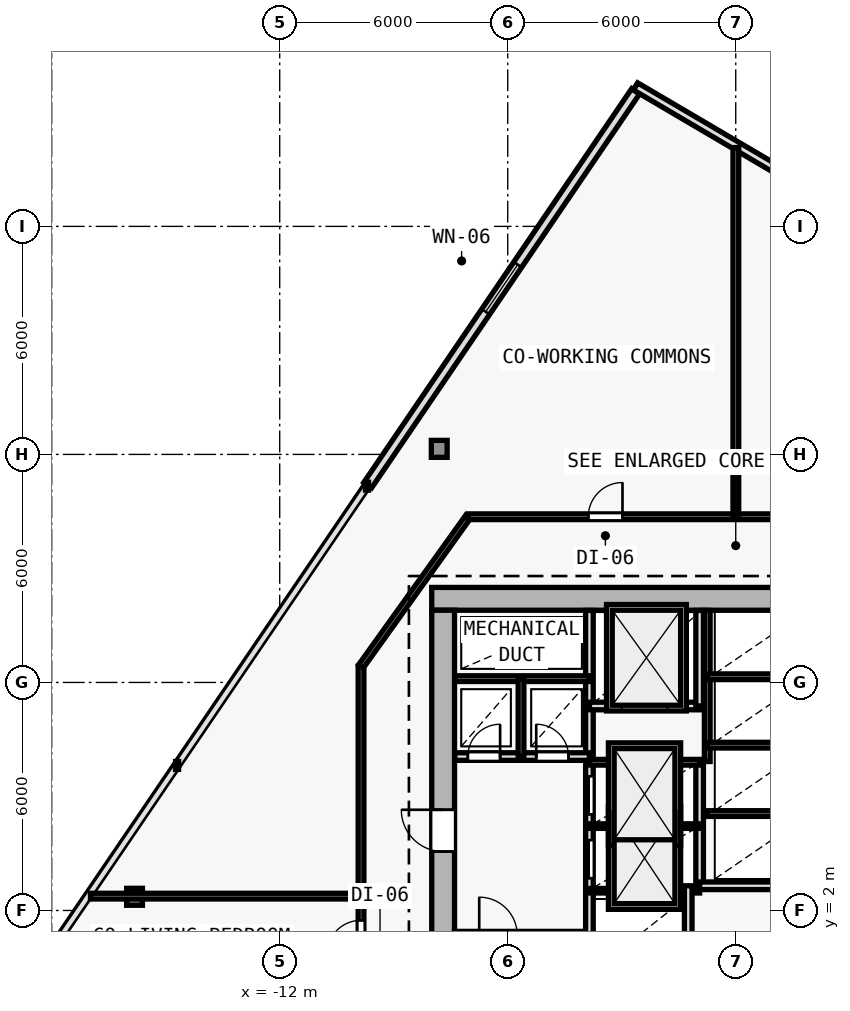
"""IFC4 building model, lengths in metres.
Left out: names, types, materials, properties, quantities, classifications, styles, units other than length and angle.
Written with IfcOpenShell. Run it as: python <this file> out.ifc"""

import sys

from ifc_helpers import new_model, si_unit, direction, frame, frame_2d, origin, origin_2d, place, context, subcontext, project, spatial, rectangle, i_section, extrude, element, fill, save


model = new_model("IFC4")
c1 = context("Model", 3, precision=1e-05, world=origin(), true_north=direction((0.0, 1.0)))
c2 = subcontext(c1, "Body", "Model", "MODEL_VIEW")
j1 = project(units=[si_unit("LENGTHUNIT", "METRE"), si_unit("PLANEANGLEUNIT", "RADIAN")], contexts=[c1])
p1 = place(None, origin())
s1 = spatial("IfcSite", under=j1, at=p1, CompositionType="ELEMENT")
p2 = place(p1, origin())
s2 = spatial("IfcBuilding", under=s1, at=p2, CompositionType="ELEMENT")
p3 = place(p2, frame((0.0, 0.0, 48.0)))
s3 = spatial("IfcBuildingStorey", under=s2, at=p3, CompositionType="ELEMENT", Elevation=48.0)
for number, where, z_axis, x_axis in (
    (1, (-7.7, 10.2, 0.0), (0.0, 0.0, 1.0), (1.0, 0.0, 0.0)),
    (2, (-7.7, 2.0, 0.0), (0.0, 0.0, 1.0), (1.0, 0.0, 0.0)),
):
    element("IfcColumn", number, at=place(p3, frame(where, z_axis=z_axis, x_axis=x_axis)), inside=s3, PredefinedType="COLUMN", context=c2, shape_type="SweptSolid", body=[
        extrude(i_section(OverallWidth=0.416, OverallDepth=0.446, WebThickness=0.025, FlangeThickness=0.04, FilletRadius=0.015, at=origin_2d()), origin(), (0.0, 0.0, 1.0), 3.6),
    ])
p4 = place(p3, frame((-7.802, 14.146, 0.006), z_axis=(0.00877514453, -0.002516901919, 0.999958330153), x_axis=(0.275705143097, 0.961242255662, 0.0)))
e3 = element("IfcColumn", 3, at=p4, inside=s3, PredefinedType="COLUMN", context=c2, shape_type="SweptSolid", body=[
    extrude(i_section(OverallWidth=0.416, OverallDepth=0.446, WebThickness=0.025, FlangeThickness=0.04, FilletRadius=0.015, at=origin_2d()), origin(), (0.0, 0.0, 1.0), 3.589),
])
p5 = place(p3, frame((-15.82, 2.36, 0.006), z_axis=(0.017071567417, 0.009521989794, 0.999808928394), x_axis=(-0.487119351792, 0.873335409284, 0.0)))
e4 = element("IfcColumn", 4, at=p5, inside=s3, PredefinedType="COLUMN", context=c2, shape_type="SweptSolid", body=[
    extrude(i_section(OverallWidth=0.416, OverallDepth=0.446, WebThickness=0.025, FlangeThickness=0.04, FilletRadius=0.015, at=origin_2d()), origin(), (0.0, 0.0, 1.0), 3.59),
])
p6 = place(p3, frame((-9.684, 13.191, 0.0), z_axis=(0.0, 0.0, 1.0), x_axis=(0.562473549685, 0.826815279192, 0.0)))
e5 = element("IfcWall", 5, at=p6, inside=s3, PredefinedType="SOLIDWALL", context=c2, shape_type="SweptSolid", body=[
    extrude(rectangle(XDim=12.536, YDim=0.25, at=frame_2d((6.268, 0.0))), origin(), (0.0, 0.0, 1.0), 3.35),
])
p7 = place(p6, frame((5.518, 0.0, 0.62)))
e6 = element("IfcOpeningElement", 6, at=p7, cuts=e5, PredefinedType="OPENING", context=c2, shape_type="SweptSolid", body=[
    extrude(rectangle(XDim=1.5, YDim=2.0, at=frame_2d((0.75, 1.0))), frame((0.0, 0.135, 0.0), z_axis=(0.0, -1.0, 0.0), x_axis=(1.0, 0.0, 0.0)), (0.0, 0.0, 1.0), 0.27),
])
p8 = place(p3, frame((-2.635, 23.681, 0.0), z_axis=(0.0, 0.0, 1.0), x_axis=(0.862126841454, -0.506692519428, 0.0)))
e7 = element("IfcWall", 7, at=p8, inside=s3, PredefinedType="SOLIDWALL", context=c2, shape_type="SweptSolid", body=[
    extrude(rectangle(XDim=5.439, YDim=0.22, at=frame_2d((2.72, 0.0))), origin(), (0.0, 0.0, 1.0), 3.35),
])
p9 = place(p3, frame((8.0, 10.2, 0.0), z_axis=(0.0, 0.0, 1.0), x_axis=(-1.0, 0.0, 0.0)))
e8 = element("IfcWall", 8, at=p9, inside=s3, PredefinedType="SHEAR", context=c2, shape_type="SweptSolid", body=[
    extrude(rectangle(XDim=16.0, YDim=0.6, at=frame_2d((8.0, 0.0))), origin(), (0.0, 0.0, 1.0), 3.35),
])
p10 = place(p9, frame((4.45, 0.0, 0.0)))
e9 = element("IfcOpeningElement", 9, at=p10, cuts=e8, PredefinedType="OPENING", context=c2, shape_type="SweptSolid", body=[
    extrude(rectangle(XDim=1.1, YDim=2.15, at=frame_2d((0.55, 1.075))), frame((0.0, 0.31, 0.0), z_axis=(0.0, -1.0, 0.0), x_axis=(1.0, 0.0, 0.0)), (0.0, 0.0, 1.0), 0.62),
])
p11 = place(p3, frame((-7.7, -9.1, 0.0), z_axis=(0.0, 0.0, 1.0), x_axis=(0.0, 1.0, 0.0)))
e10 = element("IfcWall", 10, at=p11, inside=s3, PredefinedType="SHEAR", context=c2, shape_type="SweptSolid", body=[
    extrude(rectangle(XDim=19.0, YDim=0.6, at=frame_2d((9.5, 0.0))), origin(), (0.0, 0.0, 1.0), 3.35),
])
p12 = place(p11, frame((12.65, 0.0, 0.0)))
e11 = element("IfcOpeningElement", 11, at=p12, cuts=e10, PredefinedType="OPENING", context=c2, shape_type="SweptSolid", body=[
    extrude(rectangle(XDim=1.1, YDim=2.15, at=frame_2d((0.55, 1.075))), frame((0.0, 0.31, 0.0), z_axis=(0.0, -1.0, 0.0), x_axis=(1.0, 0.0, 0.0)), (0.0, 0.0, 1.0), 0.62),
])
p13 = place(p3, frame((-3.85, 1.35, 0.0), z_axis=(0.0, 0.0, 1.0), x_axis=(0.0, 1.0, 0.0)))
e12 = element("IfcWall", 12, at=p13, inside=s3, PredefinedType="SOLIDWALL", context=c2, shape_type="SweptSolid", body=[
    extrude(rectangle(XDim=8.545, YDim=0.2, at=frame_2d((4.272, 0.0))), origin(), (0.0, 0.0, 1.0), 3.35),
])
p14 = place(p13, frame((1.5, 0.0, 0.0)))
e13 = element("IfcOpeningElement", 13, at=p14, cuts=e12, PredefinedType="OPENING", context=c2, shape_type="SweptSolid", body=[
    extrude(rectangle(XDim=1.0, YDim=2.15, at=frame_2d((0.5, 1.075))), frame((0.0, 0.11, 0.0), z_axis=(0.0, -1.0, 0.0), x_axis=(1.0, 0.0, 0.0)), (0.0, 0.0, 1.0), 0.22),
])
p15 = place(p13, frame((3.18, 0.0, 0.0)))
e14 = element("IfcOpeningElement", 14, at=p15, cuts=e12, PredefinedType="OPENING", context=c2, shape_type="SweptSolid", body=[
    extrude(rectangle(XDim=1.0, YDim=2.15, at=frame_2d((0.5, 1.075))), frame((0.0, 0.11, 0.0), z_axis=(0.0, -1.0, 0.0), x_axis=(1.0, 0.0, 0.0)), (0.0, 0.0, 1.0), 0.22),
])
p16 = place(p3, frame((-7.395, 6.05, 0.0), z_axis=(0.0, 0.0, 1.0), x_axis=(1.0, 0.0, 0.0)))
e15 = element("IfcWall", 15, at=p16, inside=s3, PredefinedType="SOLIDWALL", context=c2, shape_type="SweptSolid", body=[
    extrude(rectangle(XDim=3.545, YDim=0.2, at=frame_2d((1.772, 0.0))), origin(), (0.0, 0.0, 1.0), 3.35),
])
p17 = place(p16, frame((0.345, 0.0, 0.0)))
e16 = element("IfcOpeningElement", 16, at=p17, cuts=e15, PredefinedType="OPENING", context=c2, shape_type="SweptSolid", body=[
    extrude(rectangle(XDim=0.85, YDim=2.1, at=frame_2d((0.425, 1.05))), frame((0.0, 0.11, 0.0), z_axis=(0.0, -1.0, 0.0), x_axis=(1.0, 0.0, 0.0)), (0.0, 0.0, 1.0), 0.22),
])
p18 = place(p16, frame((2.145, 0.0, 0.0)))
e17 = element("IfcOpeningElement", 17, at=p18, cuts=e15, PredefinedType="OPENING", context=c2, shape_type="SweptSolid", body=[
    extrude(rectangle(XDim=0.85, YDim=2.1, at=frame_2d((0.425, 1.05))), frame((0.0, 0.11, 0.0), z_axis=(0.0, -1.0, 0.0), x_axis=(1.0, 0.0, 0.0)), (0.0, 0.0, 1.0), 0.22),
])
p19 = place(p3, frame((-7.395, 8.1, 0.0), z_axis=(0.0, 0.0, 1.0), x_axis=(1.0, 0.0, 0.0)))
e18 = element("IfcWall", 18, at=p19, inside=s3, PredefinedType="PARTITIONING", context=c2, shape_type="SweptSolid", body=[
    extrude(rectangle(XDim=3.545, YDim=0.15, at=frame_2d((1.772, 0.0))), origin(), (0.0, 0.0, 1.0), 3.35),
])
p20 = place(p3, frame((-5.65, 6.05, 0.0), z_axis=(0.0, 0.0, 1.0), x_axis=(0.0, 1.0, 0.0)))
e19 = element("IfcWall", 19, at=p20, inside=s3, PredefinedType="PARTITIONING", context=c2, shape_type="SweptSolid", body=[
    extrude(rectangle(XDim=2.05, YDim=0.15, at=frame_2d((1.025, 0.0))), origin(), (0.0, 0.0, 1.0), 3.35),
])
p21 = place(p3, frame((-0.95, 2.65, 0.0), z_axis=(0.0, 0.0, 1.0), x_axis=(0.0, 1.0, 0.0)))
e20 = element("IfcWall", 20, at=p21, inside=s3, PredefinedType="SOLIDWALL", context=c2, shape_type="SweptSolid", body=[
    extrude(rectangle(XDim=3.27, YDim=0.2, at=frame_2d((1.635, 0.0))), origin(), (0.0, 0.0, 1.0), 3.35),
])
for number, where, z_axis, x_axis in (
    (21, (-3.85, 2.52, 0.0), (0.0, 0.0, 1.0), (1.0, 0.0, 0.0)),
    (22, (-3.85, 4.22, 0.0), (0.0, 0.0, 1.0), (1.0, 0.0, 0.0)),
):
    element("IfcWall", number, at=place(p3, frame(where, z_axis=z_axis, x_axis=x_axis)), inside=s3, PredefinedType="PARTITIONING", context=c2, shape_type="SweptSolid", body=[
        extrude(rectangle(XDim=2.9, YDim=0.12, at=frame_2d((1.45, 0.0))), origin(), (0.0, 0.0, 1.0), 3.35),
    ])
p22 = place(p3, frame((-3.85, 5.9, 0.0), z_axis=(0.0, 0.0, 1.0), x_axis=(1.0, 0.0, 0.0)))
e23 = element("IfcWall", 23, at=p22, inside=s3, PredefinedType="PARTITIONING", context=c2, shape_type="SweptSolid", body=[
    extrude(rectangle(XDim=2.9, YDim=0.15, at=frame_2d((1.45, 0.0))), origin(), (0.0, 0.0, 1.0), 3.35),
])
p23 = place(p3, frame((-3.85, 7.38, 0.0), z_axis=(0.0, 0.0, 1.0), x_axis=(1.0, 0.0, 0.0)))
e24 = element("IfcWall", 24, at=p23, inside=s3, PredefinedType="SOLIDWALL", context=c2, shape_type="SweptSolid", body=[
    extrude(rectangle(XDim=2.9, YDim=0.2, at=frame_2d((1.45, 0.0))), origin(), (0.0, 0.0, 1.0), 3.35),
])
p24 = place(p23, frame((0.85, 0.0, 0.0)))
e25 = element("IfcOpeningElement", 25, at=p24, cuts=e24, PredefinedType="OPENING", context=c2, shape_type="SweptSolid", body=[
    extrude(rectangle(XDim=1.2, YDim=2.2, at=frame_2d((0.6, 1.1))), frame((0.0, 0.11, 0.0), z_axis=(0.0, -1.0, 0.0), x_axis=(1.0, 0.0, 0.0)), (0.0, 0.0, 1.0), 0.22),
])
p25 = place(p3, frame((-0.95, 7.38, 0.0), z_axis=(0.0, 0.0, 1.0), x_axis=(0.0, 1.0, 0.0)))
e26 = element("IfcWall", 26, at=p25, inside=s3, PredefinedType="SOLIDWALL", context=c2, shape_type="SweptSolid", body=[
    extrude(rectangle(XDim=2.515, YDim=0.2, at=frame_2d((1.258, 0.0))), origin(), (0.0, 0.0, 1.0), 3.35),
])
p26 = place(p3, frame((-1.25, -6.05, 0.0), z_axis=(0.0, 0.0, 1.0), x_axis=(0.0, 1.0, 0.0)))
e27 = element("IfcWall", 27, at=p26, inside=s3, PredefinedType="SOLIDWALL", context=c2, shape_type="SweptSolid", body=[
    extrude(rectangle(XDim=8.7, YDim=0.2, at=frame_2d((4.35, 0.0))), origin(), (0.0, 0.0, 1.0), 3.35),
])
p27 = place(p3, frame((-0.95, 2.65, 0.0), z_axis=(0.0, 0.0, 1.0), x_axis=(1.0, 0.0, 0.0)))
e28 = element("IfcWall", 28, at=p27, inside=s3, PredefinedType="SOLIDWALL", context=c2, shape_type="SweptSolid", body=[
    extrude(rectangle(XDim=2.9, YDim=0.2, at=frame_2d((1.45, 0.0))), origin(), (0.0, 0.0, 1.0), 3.35),
])
p28 = place(p3, frame((-0.75, 5.92, 0.0), z_axis=(0.0, 0.0, 1.0), x_axis=(0.0, 1.0, 0.0)))
e29 = element("IfcWall", 29, at=p28, inside=s3, PredefinedType="PARTITIONING", context=c2, shape_type="SweptSolid", body=[
    extrude(rectangle(XDim=3.975, YDim=0.15, at=frame_2d((1.988, 0.0))), origin(), (0.0, 0.0, 1.0), 3.35),
])
for number, where, z_axis, x_axis in (
    (30, (-0.75, 4.55, 0.0), (0.0, 0.0, 1.0), (1.0, 0.0, 0.0)),
    (31, (-0.75, 6.35, 0.0), (0.0, 0.0, 1.0), (1.0, 0.0, 0.0)),
    (32, (-0.75, 8.15, 0.0), (0.0, 0.0, 1.0), (1.0, 0.0, 0.0)),
):
    element("IfcWall", number, at=place(p3, frame(where, z_axis=z_axis, x_axis=x_axis)), inside=s3, PredefinedType="PARTITIONING", context=c2, shape_type="SweptSolid", body=[
        extrude(rectangle(XDim=2.7, YDim=0.15, at=frame_2d((1.35, 0.0))), origin(), (0.0, 0.0, 1.0), 3.35),
    ])
p29 = place(p3, frame((-9.86, -11.56, 0.0), z_axis=(0.0, 0.0, 1.0), x_axis=(0.0, 1.0, 0.0)))
e33 = element("IfcWall", 33, at=p29, inside=s3, PredefinedType="PARTITIONING", context=c2, shape_type="SweptSolid", body=[
    extrude(rectangle(XDim=19.986, YDim=0.15, at=frame_2d((9.993, 0.0))), origin(), (0.0, 0.0, 1.0), 2.609),
])
p30 = place(p29, frame((9.715, 0.0, 0.0)))
e34 = element("IfcOpeningElement", 34, at=p30, cuts=e33, PredefinedType="OPENING", context=c2, shape_type="SweptSolid", body=[
    extrude(rectangle(XDim=0.9, YDim=2.1, at=frame_2d((0.45, 1.05))), frame((0.0, 0.085, 0.0), z_axis=(0.0, -1.0, 0.0), x_axis=(1.0, 0.0, 0.0)), (0.0, 0.0, 1.0), 0.17),
])
p31 = place(p29, frame((6.553, 0.0, 0.0)))
e35 = element("IfcOpeningElement", 35, at=p31, cuts=e33, PredefinedType="OPENING", context=c2, shape_type="SweptSolid", body=[
    extrude(rectangle(XDim=0.9, YDim=2.1, at=frame_2d((0.45, 1.05))), frame((0.0, 0.085, 0.0), z_axis=(0.0, -1.0, 0.0), x_axis=(1.0, 0.0, 0.0)), (0.0, 0.0, 1.0), 0.17),
])
p32 = place(p29, frame((3.356, 0.0, 0.0)))
e36 = element("IfcOpeningElement", 36, at=p32, cuts=e33, PredefinedType="OPENING", context=c2, shape_type="SweptSolid", body=[
    extrude(rectangle(XDim=0.9, YDim=2.1, at=frame_2d((0.45, 1.05))), frame((0.0, 0.085, 0.0), z_axis=(0.0, -1.0, 0.0), x_axis=(1.0, 0.0, 0.0)), (0.0, 0.0, 1.0), 0.17),
])
p33 = place(p29, frame((0.725, 0.0, 0.0)))
e37 = element("IfcOpeningElement", 37, at=p33, cuts=e33, PredefinedType="OPENING", context=c2, shape_type="SweptSolid", body=[
    extrude(rectangle(XDim=0.9, YDim=2.1, at=frame_2d((0.45, 1.05))), frame((0.0, 0.085, 0.0), z_axis=(0.0, -1.0, 0.0), x_axis=(1.0, 0.0, 0.0)), (0.0, 0.0, 1.0), 0.17),
])
p34 = place(p29, frame((12.4, 0.0, 0.0)))
e38 = element("IfcOpeningElement", 38, at=p34, cuts=e33, PredefinedType="OPENING", context=c2, shape_type="SweptSolid", body=[
    extrude(rectangle(XDim=0.9, YDim=2.1, at=frame_2d((0.45, 1.05))), frame((0.0, 0.085, 0.0), z_axis=(0.0, -1.0, 0.0), x_axis=(1.0, 0.0, 0.0)), (0.0, 0.0, 1.0), 0.17),
])
p35 = place(p3, frame((-9.86, 8.426, 0.0), z_axis=(0.0, 0.0, 1.0), x_axis=(0.582449511476, 0.812866881218, 0.0)))
e39 = element("IfcWall", 39, at=p35, inside=s3, PredefinedType="PARTITIONING", context=c2, shape_type="SweptSolid", body=[
    extrude(rectangle(XDim=4.84, YDim=0.15, at=frame_2d((2.42, 0.0))), origin(), (0.0, 0.0, 1.0), 2.725),
])
p36 = place(p3, frame((-7.041, 12.36, 0.0), z_axis=(0.0, 0.0, 1.0), x_axis=(1.0, 0.0, 0.0)))
e40 = element("IfcWall", 40, at=p36, inside=s3, PredefinedType="PARTITIONING", context=c2, shape_type="SweptSolid", body=[
    extrude(rectangle(XDim=14.082, YDim=0.15, at=frame_2d((7.041, 0.0))), origin(), (0.0, 0.0, 1.0), 3.35),
])
p37 = place(p36, frame((10.024, 0.0, 0.0)))
e41 = element("IfcOpeningElement", 41, at=p37, cuts=e40, PredefinedType="OPENING", context=c2, shape_type="SweptSolid", body=[
    extrude(rectangle(XDim=0.9, YDim=2.1, at=frame_2d((0.45, 1.05))), frame((0.0, 0.085, 0.0), z_axis=(0.0, -1.0, 0.0), x_axis=(1.0, 0.0, 0.0)), (0.0, 0.0, 1.0), 0.17),
])
p38 = place(p36, frame((3.161, 0.0, 0.0)))
e42 = element("IfcOpeningElement", 42, at=p38, cuts=e40, PredefinedType="OPENING", context=c2, shape_type="SweptSolid", body=[
    extrude(rectangle(XDim=0.9, YDim=2.1, at=frame_2d((0.45, 1.05))), frame((0.0, 0.085, 0.0), z_axis=(0.0, -1.0, 0.0), x_axis=(1.0, 0.0, 0.0)), (0.0, 0.0, 1.0), 0.17),
])
p39 = place(p3, frame((-9.92, 2.377, 0.0), z_axis=(0.0, 0.0, 1.0), x_axis=(-1.0, 0.0, 0.0)))
e43 = element("IfcWall", 43, at=p39, inside=s3, PredefinedType="PARTITIONING", context=c2, shape_type="SweptSolid", body=[
    extrude(rectangle(XDim=7.06, YDim=0.15, at=frame_2d((3.53, 0.0))), origin(), (0.0, 0.0, 1.0), 2.725),
])
p40 = place(p3, frame((0.003, 12.42, 0.0), z_axis=(0.0, 0.0, 1.0), x_axis=(0.0, 1.0, 0.0)))
e44 = element("IfcWall", 44, at=p40, inside=s3, PredefinedType="PARTITIONING", context=c2, shape_type="SweptSolid", body=[
    extrude(rectangle(XDim=9.653, YDim=0.15, at=frame_2d((4.827, 0.0))), origin(), (0.0, 0.0, 1.0), 2.735),
])
p41 = place(p7, origin())
e45 = element("IfcWindow", 45, at=p41, inside=s3, PartitioningType="SINGLE_PANEL", PredefinedType="WINDOW", context=c2, shape_type="SweptSolid", body=[
    extrude(rectangle(XDim=1.5, YDim=2.0, at=frame_2d((0.75, 1.0))), frame((0.0, 0.03, 0.0), z_axis=(0.0, -1.0, 0.0), x_axis=(1.0, 0.0, 0.0)), (0.0, 0.0, 1.0), 0.06),
])
fill(e6, e45)
p42 = place(p12, origin())
e46 = element("IfcDoor", 46, at=p42, inside=s3, OperationType="SINGLE_SWING_RIGHT", PredefinedType="DOOR", context=c2, shape_type="SweptSolid", body=[
    extrude(rectangle(XDim=1.1, YDim=2.15, at=frame_2d((0.55, 1.075))), frame((0.0, 0.025, 0.0), z_axis=(0.0, -1.0, 0.0), x_axis=(1.0, 0.0, 0.0)), (0.0, 0.0, 1.0), 0.05),
])
fill(e11, e46)
p43 = place(p17, origin())
e47 = element("IfcDoor", 47, at=p43, inside=s3, OperationType="SINGLE_SWING_RIGHT", PredefinedType="DOOR", context=c2, shape_type="SweptSolid", body=[
    extrude(rectangle(XDim=0.85, YDim=2.1, at=frame_2d((0.425, 1.05))), frame((0.0, 0.025, 0.0), z_axis=(0.0, -1.0, 0.0), x_axis=(1.0, 0.0, 0.0)), (0.0, 0.0, 1.0), 0.05),
])
fill(e16, e47)
p44 = place(p18, origin())
e48 = element("IfcDoor", 48, at=p44, inside=s3, OperationType="SINGLE_SWING_LEFT", PredefinedType="DOOR", context=c2, shape_type="SweptSolid", body=[
    extrude(rectangle(XDim=0.85, YDim=2.1, at=frame_2d((0.425, 1.05))), frame((0.0, 0.025, 0.0), z_axis=(0.0, -1.0, 0.0), x_axis=(1.0, 0.0, 0.0)), (0.0, 0.0, 1.0), 0.05),
])
fill(e17, e48)
p45 = place(p24, origin())
e49 = element("IfcDoor", 49, at=p45, inside=s3, OperationType="DOUBLE_DOOR_SLIDING", PredefinedType="DOOR", context=c2, shape_type="SweptSolid", body=[
    extrude(rectangle(XDim=1.2, YDim=2.2, at=frame_2d((0.6, 1.1))), frame((0.0, 0.025, 0.0), z_axis=(0.0, -1.0, 0.0), x_axis=(1.0, 0.0, 0.0)), (0.0, 0.0, 1.0), 0.05),
])
fill(e25, e49)
p46 = place(p14, origin())
e50 = element("IfcDoor", 50, at=p46, inside=s3, OperationType="DOUBLE_DOOR_SLIDING", PredefinedType="DOOR", context=c2, shape_type="SweptSolid", body=[
    extrude(rectangle(XDim=1.0, YDim=2.15, at=frame_2d((0.5, 1.075))), frame((0.0, 0.025, 0.0), z_axis=(0.0, -1.0, 0.0), x_axis=(1.0, 0.0, 0.0)), (0.0, 0.0, 1.0), 0.05),
])
fill(e13, e50)
p47 = place(p15, origin())
e51 = element("IfcDoor", 51, at=p47, inside=s3, OperationType="DOUBLE_DOOR_SLIDING", PredefinedType="DOOR", context=c2, shape_type="SweptSolid", body=[
    extrude(rectangle(XDim=1.0, YDim=2.15, at=frame_2d((0.5, 1.075))), frame((0.0, 0.025, 0.0), z_axis=(0.0, -1.0, 0.0), x_axis=(1.0, 0.0, 0.0)), (0.0, 0.0, 1.0), 0.05),
])
fill(e14, e51)
p48 = place(p38, origin())
e52 = element("IfcDoor", 52, at=p48, inside=s3, OperationType="SINGLE_SWING_RIGHT", PredefinedType="DOOR", context=c2, shape_type="SweptSolid", body=[
    extrude(rectangle(XDim=0.9, YDim=2.1, at=frame_2d((0.45, 1.05))), frame((0.0, 0.025, 0.0), z_axis=(0.0, -1.0, 0.0), x_axis=(1.0, 0.0, 0.0)), (0.0, 0.0, 1.0), 0.05),
])
fill(e42, e52)
p49 = place(p34, origin())
e53 = element("IfcDoor", 53, at=p49, inside=s3, OperationType="SINGLE_SWING_LEFT", PredefinedType="DOOR", context=c2, shape_type="SweptSolid", body=[
    extrude(rectangle(XDim=0.9, YDim=2.1, at=frame_2d((0.45, 1.05))), frame((0.0, 0.025, 0.0), z_axis=(0.0, -1.0, 0.0), x_axis=(1.0, 0.0, 0.0)), (0.0, 0.0, 1.0), 0.05),
])
fill(e38, e53)
save(model, sys.argv[1])
